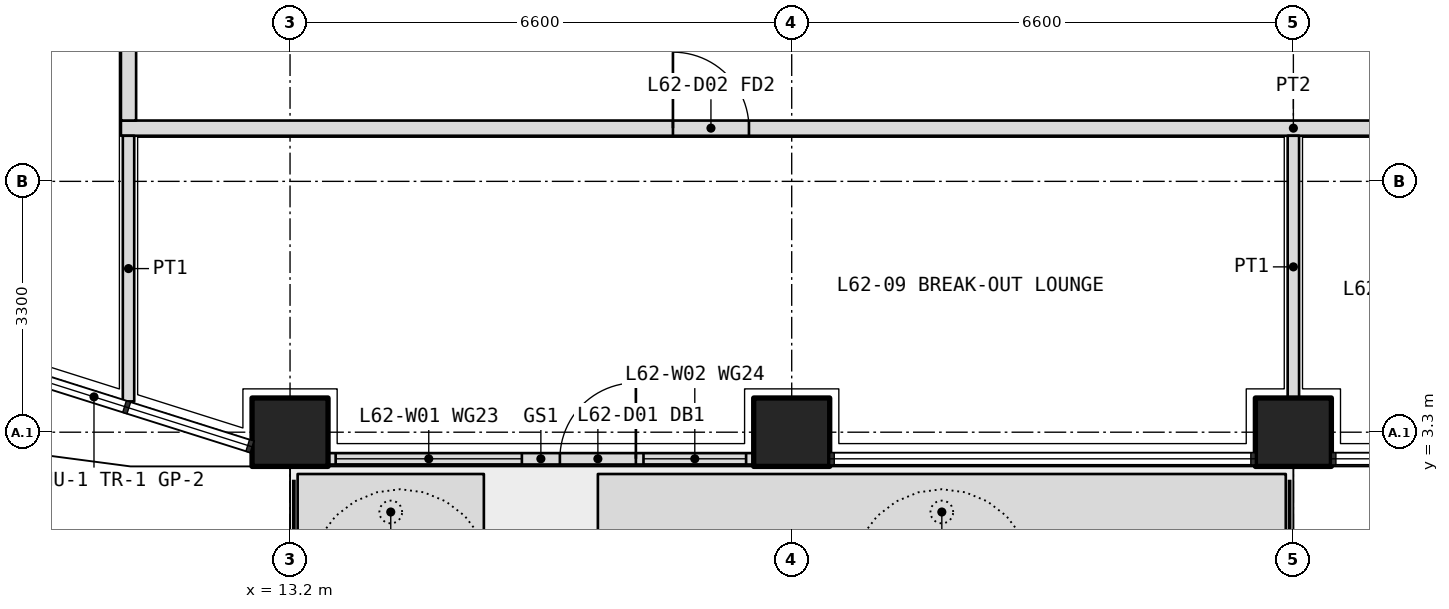
"""IFC4 building model, lengths in metres.
Left out: names, types, materials, properties, quantities, classifications, styles, units other than length and angle.
Written with IfcOpenShell. Run it as: python <this file> out.ifc"""

import sys

from ifc_helpers import new_model, si_unit, direction, frame, frame_2d, origin, origin_2d, place, context, subcontext, project, spatial, polyline, rectangle, outline, extrude, element, fill, save


model = new_model("IFC4")
c1 = context("Model", 3, precision=1e-05, world=origin(), true_north=direction((0.0, 1.0)))
c2 = subcontext(c1, "Body", "Model", "MODEL_VIEW")
j1 = project(units=[si_unit("LENGTHUNIT", "METRE"), si_unit("PLANEANGLEUNIT", "RADIAN")], contexts=[c1])
p1 = place(None, origin())
s1 = spatial("IfcSite", under=j1, at=p1, CompositionType="ELEMENT")
p2 = place(p1, origin())
s2 = spatial("IfcBuilding", under=s1, at=p2, CompositionType="ELEMENT")
p3 = place(p2, frame((0.0, 0.0, 271.2)))
s3 = spatial("IfcBuildingStorey", under=s2, at=p3, CompositionType="ELEMENT", Elevation=271.2)
for number, where, z_axis, x_axis in (
    (1, (13.2, 3.3, 0.0), (0.0, 0.0, 1.0), (1.0, 0.0, 0.0)),
    (2, (19.8, 3.3, 0.0), (0.0, 0.0, 1.0), (1.0, 0.0, 0.0)),
    (3, (26.4, 3.3, 0.0), (0.0, 0.0, 1.0), (1.0, 0.0, 0.0)),
):
    element("IfcColumn", number, at=place(p3, frame(where, z_axis=z_axis, x_axis=x_axis)), inside=s3, PredefinedType="COLUMN", context=c2, shape_type="SweptSolid", body=[
        extrude(rectangle(XDim=1.0, YDim=0.9, at=origin_2d()), origin(), (0.0, 0.0, 1.0), 4.2),
    ])
p4 = place(p3, origin())
e4 = element("IfcWall", 4, at=p4, inside=s3, PredefinedType="USERDEFINED", context=c2, shape_type="SweptSolid", body=[
    extrude(outline(polyline([(13.3, 1.75), (15.75, 1.75), (15.75, 2.75), (13.3, 2.75), (13.3, 1.75)]), holes=[polyline([(13.45, 1.9), (15.6, 1.9), (15.6, 2.6), (13.45, 2.6), (13.45, 1.9)])]), origin(), (0.0, 0.0, 1.0), 1.05),
])
p5 = place(p3, origin())
e5 = element("IfcWall", 5, at=p5, inside=s3, PredefinedType="USERDEFINED", context=c2, shape_type="SweptSolid", body=[
    extrude(outline(polyline([(17.25, 1.75), (26.3, 1.75), (26.3, 2.75), (17.25, 2.75), (17.25, 1.75)]), holes=[polyline([(17.4, 1.9), (26.15, 1.9), (26.15, 2.6), (17.4, 2.6), (17.4, 1.9)])]), origin(), (0.0, 0.0, 1.0), 1.05),
])
p6 = place(p3, frame((13.7, 2.95, 0.0), z_axis=(0.0, 0.0, 1.0), x_axis=(1.0, 0.0, 0.0)))
e6 = element("IfcWall", 6, at=p6, inside=s3, PredefinedType="SOLIDWALL", context=c2, shape_type="SweptSolid", body=[
    extrude(rectangle(XDim=5.6, YDim=0.15, at=frame_2d((2.8, 0.0))), origin(), (0.0, 0.0, 1.0), 2.7),
])
p7 = place(p6, frame((3.05, 0.0, 0.0)))
e7 = element("IfcOpeningElement", 7, at=p7, cuts=e6, PredefinedType="OPENING", context=c2, shape_type="SweptSolid", body=[
    extrude(rectangle(XDim=1.0, YDim=2.4, at=frame_2d((0.5, 1.2))), frame((0.0, 0.085, 0.0), z_axis=(0.0, -1.0, 0.0), x_axis=(1.0, 0.0, 0.0)), (0.0, 0.0, 1.0), 0.17),
])
p8 = place(p6, frame((0.1, 0.0, 0.1)))
e8 = element("IfcOpeningElement", 8, at=p8, cuts=e6, PredefinedType="OPENING", context=c2, shape_type="SweptSolid", body=[
    extrude(rectangle(XDim=2.45, YDim=2.3, at=frame_2d((1.225, 1.15))), frame((0.0, 0.085, 0.0), z_axis=(0.0, -1.0, 0.0), x_axis=(1.0, 0.0, 0.0)), (0.0, 0.0, 1.0), 0.17),
])
p9 = place(p6, frame((4.15, 0.0, 0.1)))
e9 = element("IfcOpeningElement", 9, at=p9, cuts=e6, PredefinedType="OPENING", context=c2, shape_type="SweptSolid", body=[
    extrude(rectangle(XDim=1.35, YDim=2.3, at=frame_2d((0.675, 1.15))), frame((0.0, 0.085, 0.0), z_axis=(0.0, -1.0, 0.0), x_axis=(1.0, 0.0, 0.0)), (0.0, 0.0, 1.0), 0.17),
])
p10 = place(p3, frame((10.975, 7.3, 0.0), z_axis=(0.0, 0.0, 1.0), x_axis=(1.0, 0.0, 0.0)))
e10 = element("IfcWall", 10, at=p10, inside=s3, PredefinedType="PARTITIONING", context=c2, shape_type="SweptSolid", body=[
    extrude(rectangle(XDim=30.85, YDim=0.2, at=frame_2d((15.425, 0.0))), origin(), (0.0, 0.0, 1.0), 3.0),
])
p11 = place(p10, frame((7.262, 0.0, 0.0)))
e11 = element("IfcOpeningElement", 11, at=p11, cuts=e10, PredefinedType="OPENING", context=c2, shape_type="SweptSolid", body=[
    extrude(rectangle(XDim=1.0, YDim=2.1, at=frame_2d((0.5, 1.05))), frame((0.0, 0.11, 0.0), z_axis=(0.0, -1.0, 0.0), x_axis=(1.0, 0.0, 0.0)), (0.0, 0.0, 1.0), 0.22),
])
p12 = place(p10, frame((17.025, 0.0, 0.0)))
e12 = element("IfcOpeningElement", 12, at=p12, cuts=e10, PredefinedType="OPENING", context=c2, shape_type="SweptSolid", body=[
    extrude(rectangle(XDim=1.0, YDim=2.1, at=frame_2d((0.5, 1.05))), frame((0.0, 0.11, 0.0), z_axis=(0.0, -1.0, 0.0), x_axis=(1.0, 0.0, 0.0)), (0.0, 0.0, 1.0), 0.22),
])
p13 = place(p10, frame((20.325, 0.0, 0.0)))
e13 = element("IfcOpeningElement", 13, at=p13, cuts=e10, PredefinedType="OPENING", context=c2, shape_type="SweptSolid", body=[
    extrude(rectangle(XDim=1.0, YDim=2.1, at=frame_2d((0.5, 1.05))), frame((0.0, 0.11, 0.0), z_axis=(0.0, -1.0, 0.0), x_axis=(1.0, 0.0, 0.0)), (0.0, 0.0, 1.0), 0.22),
])
p14 = place(p10, frame((25.887, 0.0, 0.0)))
e14 = element("IfcOpeningElement", 14, at=p14, cuts=e10, PredefinedType="OPENING", context=c2, shape_type="SweptSolid", body=[
    extrude(rectangle(XDim=1.0, YDim=2.1, at=frame_2d((0.5, 1.05))), frame((0.0, 0.11, 0.0), z_axis=(0.0, -1.0, 0.0), x_axis=(1.0, 0.0, 0.0)), (0.0, 0.0, 1.0), 0.22),
])
p15 = place(p3, frame((11.075, 7.4, 0.0), z_axis=(0.0, 0.0, 1.0), x_axis=(0.0, 1.0, 0.0)))
e15 = element("IfcWall", 15, at=p15, inside=s3, PredefinedType="PARTITIONING", context=c2, shape_type="SweptSolid", body=[
    extrude(rectangle(XDim=31.4, YDim=0.2, at=frame_2d((15.7, 0.0))), origin(), (0.0, 0.0, 1.0), 3.0),
])
p16 = place(p15, frame((2.35, 0.0, 0.0)))
e16 = element("IfcOpeningElement", 16, at=p16, cuts=e15, PredefinedType="OPENING", context=c2, shape_type="SweptSolid", body=[
    extrude(rectangle(XDim=1.0, YDim=2.1, at=frame_2d((0.5, 1.05))), frame((0.0, 0.11, 0.0), z_axis=(0.0, -1.0, 0.0), x_axis=(1.0, 0.0, 0.0)), (0.0, 0.0, 1.0), 0.22),
])
p17 = place(p15, frame((6.9, 0.0, 0.0)))
e17 = element("IfcOpeningElement", 17, at=p17, cuts=e15, PredefinedType="OPENING", context=c2, shape_type="SweptSolid", body=[
    extrude(rectangle(XDim=1.0, YDim=2.1, at=frame_2d((0.5, 1.05))), frame((0.0, 0.11, 0.0), z_axis=(0.0, -1.0, 0.0), x_axis=(1.0, 0.0, 0.0)), (0.0, 0.0, 1.0), 0.22),
])
p18 = place(p15, frame((10.35, 0.0, 0.0)))
e18 = element("IfcOpeningElement", 18, at=p18, cuts=e15, PredefinedType="OPENING", context=c2, shape_type="SweptSolid", body=[
    extrude(rectangle(XDim=0.9, YDim=2.1, at=frame_2d((0.45, 1.05))), frame((0.0, 0.11, 0.0), z_axis=(0.0, -1.0, 0.0), x_axis=(1.0, 0.0, 0.0)), (0.0, 0.0, 1.0), 0.22),
])
p19 = place(p15, frame((13.7, 0.0, 0.0)))
e19 = element("IfcOpeningElement", 19, at=p19, cuts=e15, PredefinedType="OPENING", context=c2, shape_type="SweptSolid", body=[
    extrude(rectangle(XDim=0.9, YDim=2.1, at=frame_2d((0.45, 1.05))), frame((0.0, 0.11, 0.0), z_axis=(0.0, -1.0, 0.0), x_axis=(1.0, 0.0, 0.0)), (0.0, 0.0, 1.0), 0.22),
])
p20 = place(p15, frame((18.5, 0.0, 0.0)))
e20 = element("IfcOpeningElement", 20, at=p20, cuts=e15, PredefinedType="OPENING", context=c2, shape_type="SweptSolid", body=[
    extrude(rectangle(XDim=1.0, YDim=2.1, at=frame_2d((0.5, 1.05))), frame((0.0, 0.11, 0.0), z_axis=(0.0, -1.0, 0.0), x_axis=(1.0, 0.0, 0.0)), (0.0, 0.0, 1.0), 0.22),
])
p21 = place(p15, frame((23.45, 0.0, 0.0)))
e21 = element("IfcOpeningElement", 21, at=p21, cuts=e15, PredefinedType="OPENING", context=c2, shape_type="SweptSolid", body=[
    extrude(rectangle(XDim=1.0, YDim=2.1, at=frame_2d((0.5, 1.05))), frame((0.0, 0.11, 0.0), z_axis=(0.0, -1.0, 0.0), x_axis=(1.0, 0.0, 0.0)), (0.0, 0.0, 1.0), 0.22),
])
p22 = place(p15, frame((28.05, 0.0, 0.0)))
e22 = element("IfcOpeningElement", 22, at=p22, cuts=e15, PredefinedType="OPENING", context=c2, shape_type="SweptSolid", body=[
    extrude(rectangle(XDim=1.0, YDim=2.1, at=frame_2d((0.5, 1.05))), frame((0.0, 0.11, 0.0), z_axis=(0.0, -1.0, 0.0), x_axis=(1.0, 0.0, 0.0)), (0.0, 0.0, 1.0), 0.22),
])
p23 = place(p3, frame((11.075, 3.705, 0.0), z_axis=(0.0, 0.0, 1.0), x_axis=(0.0, 1.0, 0.0)))
e23 = element("IfcWall", 23, at=p23, inside=s3, PredefinedType="PARTITIONING", context=c2, shape_type="SweptSolid", body=[
    extrude(rectangle(XDim=3.495, YDim=0.15, at=frame_2d((1.748, 0.0))), origin(), (0.0, 0.0, 1.0), 2.7),
])
p24 = place(p3, frame((26.4, 3.75, 0.0), z_axis=(0.0, 0.0, 1.0), x_axis=(0.0, 1.0, 0.0)))
e24 = element("IfcWall", 24, at=p24, inside=s3, PredefinedType="PARTITIONING", context=c2, shape_type="SweptSolid", body=[
    extrude(rectangle(XDim=3.45, YDim=0.15, at=frame_2d((1.725, 0.0))), origin(), (0.0, 0.0, 1.0), 3.0),
])
p25 = place(p7, origin())
e25 = element("IfcDoor", 25, at=p25, inside=s3, OperationType="SINGLE_SWING_RIGHT", PredefinedType="DOOR", context=c2, shape_type="SweptSolid", body=[
    extrude(rectangle(XDim=1.0, YDim=2.4, at=frame_2d((0.5, 1.2))), frame((0.0, 0.025, 0.0), z_axis=(0.0, -1.0, 0.0), x_axis=(1.0, 0.0, 0.0)), (0.0, 0.0, 1.0), 0.05),
])
fill(e7, e25)
p26 = place(p8, origin())
e26 = element("IfcWindow", 26, at=p26, inside=s3, PartitioningType="SINGLE_PANEL", PredefinedType="WINDOW", context=c2, shape_type="SweptSolid", body=[
    extrude(rectangle(XDim=2.45, YDim=2.3, at=frame_2d((1.225, 1.15))), frame((0.0, 0.03, 0.0), z_axis=(0.0, -1.0, 0.0), x_axis=(1.0, 0.0, 0.0)), (0.0, 0.0, 1.0), 0.06),
])
fill(e8, e26)
p27 = place(p9, origin())
e27 = element("IfcWindow", 27, at=p27, inside=s3, PartitioningType="SINGLE_PANEL", PredefinedType="WINDOW", context=c2, shape_type="SweptSolid", body=[
    extrude(rectangle(XDim=1.35, YDim=2.3, at=frame_2d((0.675, 1.15))), frame((0.0, 0.03, 0.0), z_axis=(0.0, -1.0, 0.0), x_axis=(1.0, 0.0, 0.0)), (0.0, 0.0, 1.0), 0.06),
])
fill(e9, e27)
p28 = place(p11, origin())
e28 = element("IfcDoor", 28, at=p28, inside=s3, OperationType="SINGLE_SWING_LEFT", PredefinedType="DOOR", context=c2, shape_type="SweptSolid", body=[
    extrude(rectangle(XDim=1.0, YDim=2.1, at=frame_2d((0.5, 1.05))), frame((0.0, 0.025, 0.0), z_axis=(0.0, -1.0, 0.0), x_axis=(1.0, 0.0, 0.0)), (0.0, 0.0, 1.0), 0.05),
])
fill(e11, e28)
save(model, sys.argv[1])
